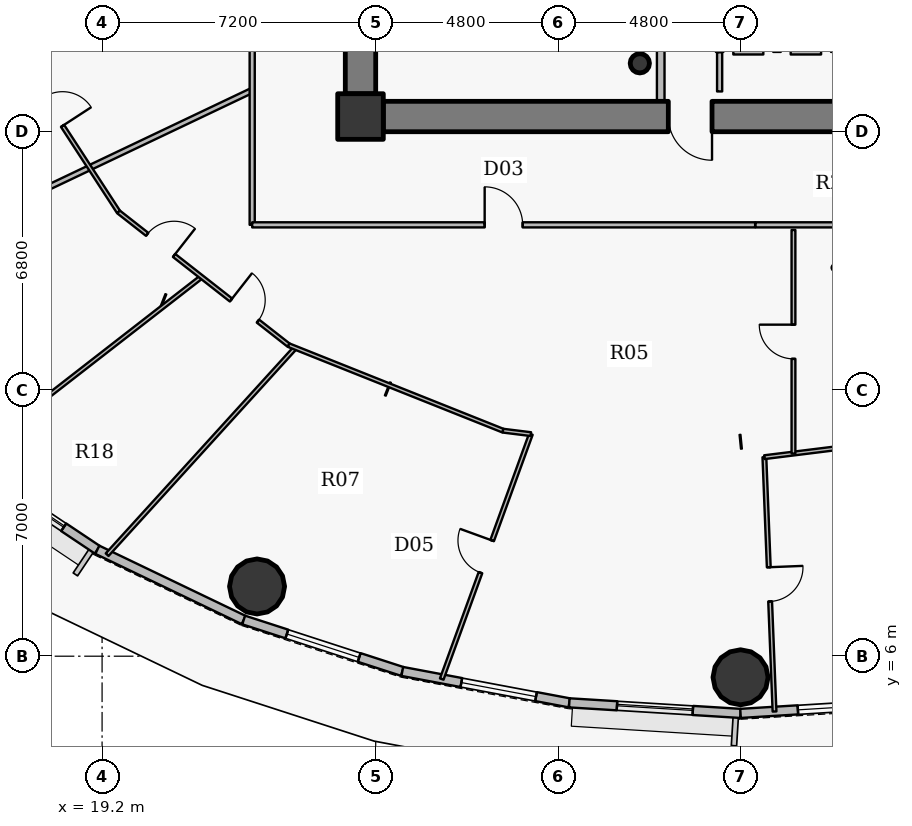
"""IFC4 building model, lengths in metres.
Left out: names, types, materials, properties, quantities, classifications, styles, units other than length and angle.
Written with IfcOpenShell. Run it as: python <this file> out.ifc"""

import sys

from ifc_helpers import new_model, si_unit, direction, frame, frame_2d, origin, origin_2d, place, context, subcontext, project, spatial, rectangle, hollow_circle, extrude, source, transform, mapped, element, fill, save


model = new_model("IFC4")
c1 = context("Model", 3, precision=1e-05, world=origin(), true_north=direction((0.0, 1.0)))
c2 = subcontext(c1, "Body", "Model", "MODEL_VIEW")
j1 = project(units=[si_unit("LENGTHUNIT", "METRE"), si_unit("PLANEANGLEUNIT", "RADIAN")], contexts=[c1])
p1 = place(None, origin())
s1 = spatial("IfcSite", under=j1, at=p1, CompositionType="ELEMENT")
p2 = place(p1, origin())
s2 = spatial("IfcBuilding", under=s1, at=p2, CompositionType="ELEMENT")
p3 = place(p2, frame((0.0, 0.0, 92.4)))
s3 = spatial("IfcBuildingStorey", under=s2, at=p3, CompositionType="ELEMENT", Elevation=92.4)
p4 = place(p3, frame((26.0, 20.2, 0.0), z_axis=(0.0, 0.0, 1.0), x_axis=(1.0, 0.0, 0.0)))
e1 = element("IfcColumn", 1, at=p4, inside=s3, PredefinedType="COLUMN", context=c2, shape_type="SweptSolid", body=[
    extrude(rectangle(XDim=1.2, YDim=1.2, at=origin_2d()), origin(), (0.0, 0.0, 1.0), 4.8),
])
p5 = place(p3, frame((33.35, 21.6, 0.0), z_axis=(0.0, 0.0, 1.0), x_axis=(1.0, 0.0, 0.0)))
e2 = element("IfcColumn", 2, at=p5, inside=s3, PredefinedType="COLUMN", context=c2, shape_type="SweptSolid", body=[
    extrude(hollow_circle(Radius=0.254, WallThickness=0.02, at=origin_2d()), origin(), (0.0, 0.0, 1.0), 4.8),
])
p6 = place(p3, frame((45.4, 20.2, 0.0), z_axis=(0.0, 0.0, 1.0), x_axis=(-1.0, 0.0, 0.0)))
e3 = element("IfcWall", 3, at=p6, inside=s3, PredefinedType="SHEAR", context=c2, shape_type="SweptSolid", body=[
    extrude(rectangle(XDim=18.8, YDim=0.8, at=frame_2d((9.4, 0.0))), origin(), (0.0, 0.0, 1.0), 4.0),
])
p7 = place(p6, frame((10.15, 0.0, 0.0)))
e4 = element("IfcOpeningElement", 4, at=p7, cuts=e3, PredefinedType="OPENING", context=c2, shape_type="SweptSolid", body=[
    extrude(rectangle(XDim=1.15, YDim=2.15, at=origin_2d()), frame((0.575, 0.41, 1.075), z_axis=(0.0, -1.0, 0.0), x_axis=(1.0, 0.0, 0.0)), (0.0, 0.0, 1.0), 0.82),
])
p8 = place(p3, frame((26.0, 20.8, 0.0), z_axis=(0.0, 0.0, 1.0), x_axis=(0.0, 1.0, 0.0)))
e5 = element("IfcWall", 5, at=p8, inside=s3, PredefinedType="SHEAR", context=c2, shape_type="SweptSolid", body=[
    extrude(rectangle(XDim=12.4, YDim=0.8, at=frame_2d((6.2, 0.0))), origin(), (0.0, 0.0, 1.0), 4.0),
])
p9 = place(p8, frame((5.79, 0.0, 0.0)))
e6 = element("IfcOpeningElement", 6, at=p9, cuts=e5, PredefinedType="OPENING", context=c2, shape_type="SweptSolid", body=[
    extrude(rectangle(XDim=0.82, YDim=2.1, at=origin_2d()), frame((0.41, 0.41, 1.05), z_axis=(0.0, -1.0, 0.0), x_axis=(1.0, 0.0, 0.0)), (0.0, 0.0, 1.0), 0.82),
])
for number, where, z_axis, x_axis in (
    (7, (23.278, 7.835, -0.3), (0.0, 0.0, 1.0), (1.0, 0.0, 0.0)),
    (8, (36.0, 5.445, -0.3), (0.0, 0.0, 1.0), (1.0, 0.0, 0.0)),
):
    element("IfcColumn", number, at=place(p3, frame(where, z_axis=z_axis, x_axis=x_axis)), inside=s3, PredefinedType="COLUMN", context=c2, shape_type="SweptSolid", body=[
        extrude(hollow_circle(Radius=0.725, WallThickness=0.042, at=origin_2d()), origin(), (0.0, 0.0, 1.0), 5.1),
    ])
p10 = place(p3, frame((19.075, 8.801, 0.0), z_axis=(0.0, 0.0, 1.0), x_axis=(-0.831221811447, 0.555940914284, 0.0)))
e9 = element("IfcWall", 9, at=p10, inside=s3, PredefinedType="SOLIDWALL", context=c2, shape_type="SweptSolid", body=[
    extrude(rectangle(XDim=4.13, YDim=0.24, at=frame_2d((2.065, 0.0))), origin(), (0.0, 0.0, 1.0), 4.55),
])
p11 = place(p10, frame((1.065, 0.0, 0.9)))
e10 = element("IfcOpeningElement", 10, at=p11, cuts=e9, PredefinedType="OPENING", context=c2, shape_type="SweptSolid", body=[
    extrude(rectangle(XDim=2.0, YDim=1.75, at=origin_2d()), frame((1.0, 0.13, 0.875), z_axis=(0.0, -1.0, 0.0), x_axis=(1.0, 0.0, 0.0)), (0.0, 0.0, 1.0), 0.26),
])
p12 = place(p3, frame((22.926, 6.953, 0.0), z_axis=(0.0, 0.0, 1.0), x_axis=(-0.901589935876, 0.432591709962, 0.0)))
e11 = element("IfcWall", 11, at=p12, inside=s3, PredefinedType="SOLIDWALL", context=c2, shape_type="SweptSolid", body=[
    extrude(rectangle(XDim=4.272, YDim=0.24, at=frame_2d((2.136, 0.0))), origin(), (0.0, 0.0, 1.0), 4.55),
])
p13 = place(p3, frame((27.1, 5.599, 0.0), z_axis=(0.0, 0.0, 1.0), x_axis=(-0.951211346073, 0.308540070495, 0.0)))
e12 = element("IfcWall", 12, at=p13, inside=s3, PredefinedType="SOLIDWALL", context=c2, shape_type="SweptSolid", body=[
    extrude(rectangle(XDim=4.388, YDim=0.24, at=frame_2d((2.194, 0.0))), origin(), (0.0, 0.0, 1.0), 4.55),
])
p14 = place(p13, frame((1.194, 0.0, 0.9)))
e13 = element("IfcOpeningElement", 13, at=p14, cuts=e12, PredefinedType="OPENING", context=c2, shape_type="SweptSolid", body=[
    extrude(rectangle(XDim=2.0, YDim=1.75, at=origin_2d()), frame((1.0, 0.13, 0.875), z_axis=(0.0, -1.0, 0.0), x_axis=(1.0, 0.0, 0.0)), (0.0, 0.0, 1.0), 0.26),
])
p15 = place(p3, frame((31.494, 4.773, 0.0), z_axis=(0.0, 0.0, 1.0), x_axis=(-0.982789252177, 0.184730305596, 0.0)))
e14 = element("IfcWall", 14, at=p15, inside=s3, PredefinedType="SOLIDWALL", context=c2, shape_type="SweptSolid", body=[
    extrude(rectangle(XDim=4.471, YDim=0.24, at=frame_2d((2.235, 0.0))), origin(), (0.0, 0.0, 1.0), 4.55),
])
p16 = place(p15, frame((0.89, 0.0, 0.9)))
e15 = element("IfcOpeningElement", 15, at=p16, cuts=e14, PredefinedType="OPENING", context=c2, shape_type="SweptSolid", body=[
    extrude(rectangle(XDim=2.0, YDim=1.75, at=origin_2d()), frame((1.0, 0.13, 0.875), z_axis=(0.0, -1.0, 0.0), x_axis=(1.0, 0.0, 0.0)), (0.0, 0.0, 1.0), 0.26),
])
p17 = place(p3, frame((36.0, 4.495, 0.0), z_axis=(0.0, 0.0, 1.0), x_axis=(-0.998107531589, 0.061492726276, 0.0)))
e16 = element("IfcWall", 16, at=p17, inside=s3, PredefinedType="SOLIDWALL", context=c2, shape_type="SweptSolid", body=[
    extrude(rectangle(XDim=4.514, YDim=0.24, at=frame_2d((2.257, 0.0))), origin(), (0.0, 0.0, 1.0), 4.55),
])
p18 = place(p17, frame((1.257, 0.0, 0.9)))
e17 = element("IfcOpeningElement", 17, at=p18, cuts=e16, PredefinedType="OPENING", context=c2, shape_type="SweptSolid", body=[
    extrude(rectangle(XDim=2.0, YDim=1.75, at=origin_2d()), frame((1.0, 0.13, 0.875), z_axis=(0.0, -1.0, 0.0), x_axis=(1.0, 0.0, 0.0)), (0.0, 0.0, 1.0), 0.26),
])
p19 = place(p3, frame((40.506, 4.773, 0.0), z_axis=(0.0, 0.0, 1.0), x_axis=(-0.998107531589, -0.061492726276, 0.0)))
e18 = element("IfcWall", 18, at=p19, inside=s3, PredefinedType="SOLIDWALL", context=c2, shape_type="SweptSolid", body=[
    extrude(rectangle(XDim=4.514, YDim=0.24, at=frame_2d((2.257, 0.0))), origin(), (0.0, 0.0, 1.0), 4.55),
])
p20 = place(p19, frame((1.001, 0.0, 0.9)))
e19 = element("IfcOpeningElement", 19, at=p20, cuts=e18, PredefinedType="OPENING", context=c2, shape_type="SweptSolid", body=[
    extrude(rectangle(XDim=2.0, YDim=1.75, at=origin_2d()), frame((1.0, 0.13, 0.875), z_axis=(0.0, -1.0, 0.0), x_axis=(1.0, 0.0, 0.0)), (0.0, 0.0, 1.0), 0.26),
])
p21 = place(p3, frame((11.486, 15.34, 0.0), z_axis=(0.0, 0.0, 1.0), x_axis=(0.903055043221, 0.429524840857, 0.0)))
e20 = element("IfcWall", 20, at=p21, inside=s3, PredefinedType="PARTITIONING", context=c2, shape_type="SweptSolid", body=[
    extrude(rectangle(XDim=12.916, YDim=0.135, at=frame_2d((6.458, 0.0))), origin(), (0.0, 0.0, 1.0), 3.985),
])
p22 = place(p3, frame((15.586, 11.141, 0.0), z_axis=(0.0, 0.0, 1.0), x_axis=(0.789708718244, 0.613481980445, 0.0)))
e21 = element("IfcWall", 21, at=p22, inside=s3, PredefinedType="PARTITIONING", context=c2, shape_type="SweptSolid", body=[
    extrude(rectangle(XDim=7.888, YDim=0.1, at=frame_2d((3.944, 0.0))), origin(), (0.0, 0.0, 1.0), 3.985),
])
p23 = place(p3, frame((16.76, 22.105, 0.0), z_axis=(0.0, 0.0, 1.0), x_axis=(0.545405249109, -0.838172484781, 0.0)))
e22 = element("IfcWall", 22, at=p23, inside=s3, PredefinedType="PARTITIONING", context=c2, shape_type="SweptSolid", body=[
    extrude(rectangle(XDim=5.269, YDim=0.1, at=frame_2d((2.634, 0.0))), origin(), (0.0, 0.0, 1.0), 3.985),
])
p24 = place(p23, frame((1.666, 0.0, 0.0)))
e23 = element("IfcOpeningElement", 23, at=p24, cuts=e22, PredefinedType="OPENING", context=c2, shape_type="SweptSolid", body=[
    extrude(rectangle(XDim=0.9, YDim=2.1, at=origin_2d()), frame((0.45, 0.06, 1.05), z_axis=(0.0, -1.0, 0.0), x_axis=(1.0, 0.0, 0.0)), (0.0, 0.0, 1.0), 0.12),
])
p25 = place(p3, frame((19.333, 8.671, 0.0), z_axis=(0.0, 0.0, 1.0), x_axis=(0.672765273406, 0.739855990649, 0.0)))
e24 = element("IfcWall", 24, at=p25, inside=s3, PredefinedType="PARTITIONING", context=c2, shape_type="SweptSolid", body=[
    extrude(rectangle(XDim=7.358, YDim=0.1, at=frame_2d((3.679, 0.0))), origin(), (0.0, 0.0, 1.0), 3.985),
])
p26 = place(p3, frame((19.634, 17.689, 0.0), z_axis=(0.0, 0.0, 1.0), x_axis=(0.787333679705, -0.616527109544, 0.0)))
e25 = element("IfcWall", 25, at=p26, inside=s3, PredefinedType="PARTITIONING", context=c2, shape_type="SweptSolid", body=[
    extrude(rectangle(XDim=5.685, YDim=0.1, at=frame_2d((2.842, 0.0))), origin(), (0.0, 0.0, 1.0), 3.985),
])
p27 = place(p26, frame((0.956, 0.0, 0.0)))
e26 = element("IfcOpeningElement", 26, at=p27, cuts=e25, PredefinedType="OPENING", context=c2, shape_type="SweptSolid", body=[
    extrude(rectangle(XDim=0.9, YDim=2.1, at=origin_2d()), frame((0.45, 0.06, 1.05), z_axis=(0.0, -1.0, 0.0), x_axis=(1.0, 0.0, 0.0)), (0.0, 0.0, 1.0), 0.12),
])
p28 = place(p26, frame((3.758, 0.0, 0.0)))
e27 = element("IfcOpeningElement", 27, at=p28, cuts=e25, PredefinedType="OPENING", context=c2, shape_type="SweptSolid", body=[
    extrude(rectangle(XDim=0.9, YDim=2.1, at=origin_2d()), frame((0.45, 0.06, 1.05), z_axis=(0.0, -1.0, 0.0), x_axis=(1.0, 0.0, 0.0)), (0.0, 0.0, 1.0), 0.12),
])
p29 = place(p3, frame((23.15, 17.35, 0.0), z_axis=(0.0, 0.0, 1.0), x_axis=(0.0, 1.0, 0.0)))
e28 = element("IfcWall", 28, at=p29, inside=s3, PredefinedType="PARTITIONING", context=c2, shape_type="SweptSolid", body=[
    extrude(rectangle(XDim=19.3, YDim=0.135, at=frame_2d((9.65, 0.0))), origin(), (0.0, 0.0, 1.0), 3.985),
])
p30 = place(p29, frame((10.899, 0.0, 0.0)))
e29 = element("IfcOpeningElement", 29, at=p30, cuts=e28, PredefinedType="OPENING", context=c2, shape_type="SweptSolid", body=[
    extrude(rectangle(XDim=1.0, YDim=2.15, at=origin_2d()), frame((0.5, 0.078, 1.075), z_axis=(0.0, -1.0, 0.0), x_axis=(1.0, 0.0, 0.0)), (0.0, 0.0, 1.0), 0.155),
])
p31 = place(p3, frame((23.15, 17.35, 0.0), z_axis=(0.0, 0.0, 1.0), x_axis=(1.0, 0.0, 0.0)))
e30 = element("IfcWall", 30, at=p31, inside=s3, PredefinedType="PARTITIONING", context=c2, shape_type="SweptSolid", body=[
    extrude(rectangle(XDim=13.235, YDim=0.135, at=frame_2d((6.617, 0.0))), origin(), (0.0, 0.0, 1.0), 3.985),
])
p32 = place(p31, frame((6.117, 0.0, 0.0)))
e31 = element("IfcOpeningElement", 31, at=p32, cuts=e30, PredefinedType="OPENING", context=c2, shape_type="SweptSolid", body=[
    extrude(rectangle(XDim=1.0, YDim=2.15, at=origin_2d()), frame((0.5, 0.078, 1.075), z_axis=(0.0, -1.0, 0.0), x_axis=(1.0, 0.0, 0.0)), (0.0, 0.0, 1.0), 0.155),
])
p33 = place(p3, frame((24.109, 14.184, 0.0), z_axis=(0.0, 0.0, 1.0), x_axis=(0.928803554156, -0.370572473055, 0.0)))
e32 = element("IfcWall", 32, at=p33, inside=s3, PredefinedType="PARTITIONING", context=c2, shape_type="SweptSolid", body=[
    extrude(rectangle(XDim=6.072, YDim=0.1, at=frame_2d((3.036, 0.0))), origin(), (0.0, 0.0, 1.0), 3.985),
])
p34 = place(p3, frame((28.138, 5.399, 0.0), z_axis=(0.0, 0.0, 1.0), x_axis=(0.342028873388, 0.939689443257, 0.0)))
e33 = element("IfcWall", 33, at=p34, inside=s3, PredefinedType="PARTITIONING", context=c2, shape_type="SweptSolid", body=[
    extrude(rectangle(XDim=6.858, YDim=0.1, at=frame_2d((3.429, 0.0))), origin(), (0.0, 0.0, 1.0), 3.985),
])
p35 = place(p34, frame((2.979, 0.0, 0.0)))
e34 = element("IfcOpeningElement", 34, at=p35, cuts=e33, PredefinedType="OPENING", context=c2, shape_type="SweptSolid", body=[
    extrude(rectangle(XDim=0.9, YDim=2.1, at=origin_2d()), frame((0.45, 0.06, 1.05), z_axis=(0.0, -1.0, 0.0), x_axis=(1.0, 0.0, 0.0)), (0.0, 0.0, 1.0), 0.12),
])
p36 = place(p3, frame((29.749, 11.934, 0.0), z_axis=(0.0, 0.0, 1.0), x_axis=(0.992409197435, -0.122979611509, 0.0)))
e35 = element("IfcWall", 35, at=p36, inside=s3, PredefinedType="PARTITIONING", context=c2, shape_type="SweptSolid", body=[
    extrude(rectangle(XDim=0.74, YDim=0.1, at=frame_2d((0.37, 0.0))), origin(), (0.0, 0.0, 1.0), 4.55),
])
p37 = place(p3, frame((33.9, 20.6, 0.0), z_axis=(0.0, 0.0, 1.0), x_axis=(0.0, 1.0, 0.0)))
e36 = element("IfcWall", 36, at=p37, inside=s3, PredefinedType="PARTITIONING", context=c2, shape_type="SweptSolid", body=[
    extrude(rectangle(XDim=11.5, YDim=0.2, at=frame_2d((5.75, 0.0))), origin(), (0.0, 0.0, 1.0), 4.135),
])
p38 = place(p3, frame((36.628, 11.237, 0.0), z_axis=(0.0, 0.0, 1.0), x_axis=(0.039809346011, -0.999207293794, 0.0)))
e37 = element("IfcWall", 37, at=p38, inside=s3, PredefinedType="PARTITIONING", context=c2, shape_type="SweptSolid", body=[
    extrude(rectangle(XDim=6.697, YDim=0.1, at=frame_2d((3.349, 0.0))), origin(), (0.0, 0.0, 1.0), 3.985),
])
p39 = place(p38, frame((2.898, 0.0, 0.0)))
e38 = element("IfcOpeningElement", 38, at=p39, cuts=e37, PredefinedType="OPENING", context=c2, shape_type="SweptSolid", body=[
    extrude(rectangle(XDim=0.9, YDim=2.1, at=origin_2d()), frame((0.45, 0.06, 1.05), z_axis=(0.0, -1.0, 0.0), x_axis=(1.0, 0.0, 0.0)), (0.0, 0.0, 1.0), 0.12),
])
p40 = place(p3, frame((36.628, 11.237, 0.0), z_axis=(0.0, 0.0, 1.0), x_axis=(0.992395411507, 0.123090808834, 0.0)))
e39 = element("IfcWall", 39, at=p40, inside=s3, PredefinedType="PARTITIONING", context=c2, shape_type="SweptSolid", body=[
    extrude(rectangle(XDim=5.667, YDim=0.1, at=frame_2d((2.833, 0.0))), origin(), (0.0, 0.0, 1.0), 3.985),
])
p41 = place(p3, frame((37.393, 11.332, 0.0), z_axis=(0.0, 0.0, 1.0), x_axis=(0.0, 1.0, 0.0)))
e40 = element("IfcWall", 40, at=p41, inside=s3, PredefinedType="PARTITIONING", context=c2, shape_type="SweptSolid", body=[
    extrude(rectangle(XDim=5.884, YDim=0.1, at=frame_2d((2.942, 0.0))), origin(), (0.0, 0.0, 1.0), 4.035),
])
p42 = place(p41, frame((2.492, 0.0, 0.0)))
e41 = element("IfcOpeningElement", 41, at=p42, cuts=e40, PredefinedType="OPENING", context=c2, shape_type="SweptSolid", body=[
    extrude(rectangle(XDim=0.9, YDim=2.1, at=origin_2d()), frame((0.45, 0.06, 1.05), z_axis=(0.0, -1.0, 0.0), x_axis=(1.0, 0.0, 0.0)), (0.0, 0.0, 1.0), 0.12),
])
p43 = place(p3, frame((36.6, 21.9, 0.0), z_axis=(0.0, 0.0, 1.0), x_axis=(-1.0, 0.0, 0.0)))
e42 = element("IfcWall", 42, at=p43, inside=s3, PredefinedType="PARTITIONING", context=c2, shape_type="SweptSolid", body=[
    extrude(rectangle(XDim=0.79, YDim=0.135, at=frame_2d((0.395, 0.0))), origin(), (0.0, 0.0, 1.0), 4.55),
])
p44 = place(p3, frame((38.12, 21.9, 0.0), z_axis=(0.0, 0.0, 1.0), x_axis=(-1.0, 0.0, 0.0)))
e43 = element("IfcWall", 43, at=p44, inside=s3, PredefinedType="PARTITIONING", context=c2, shape_type="SweptSolid", body=[
    extrude(rectangle(XDim=0.8, YDim=0.135, at=frame_2d((0.4, 0.0))), origin(), (0.0, 0.0, 1.0), 4.55),
])
p45 = place(p3, frame((35.45, 21.89, 0.0), z_axis=(0.0, 0.0, 1.0), x_axis=(0.0, -1.0, 0.0)))
e44 = element("IfcWall", 44, at=p45, inside=s3, PredefinedType="PARTITIONING", context=c2, shape_type="SweptSolid", body=[
    extrude(rectangle(XDim=1.03, YDim=0.135, at=frame_2d((0.515, 0.0))), origin(), (0.0, 0.0, 1.0), 4.135),
])
p46 = place(p3, frame((38.467, 17.35, 0.0), z_axis=(0.0, 0.0, 1.0), x_axis=(-1.0, 0.0, 0.0)))
e45 = element("IfcWall", 45, at=p46, inside=s3, PredefinedType="PARTITIONING", context=c2, shape_type="SweptSolid", body=[
    extrude(rectangle(XDim=2.073, YDim=0.135, at=frame_2d((1.036, 0.0))), origin(), (0.0, 0.0, 1.0), 4.55),
])
p47 = place(p3, frame((25.6, 20.79, 0.0), z_axis=(0.0, 0.0, 1.0), x_axis=(0.0, -1.0, 0.0)))
e46 = element("IfcWall", 46, at=p47, inside=s3, PredefinedType="PARTITIONING", context=c2, shape_type="SweptSolid", body=[
    extrude(rectangle(XDim=0.99, YDim=0.135, at=frame_2d((0.495, 0.0))), origin(), (0.0, 0.0, 1.0), 4.55),
])
p48 = place(p3, frame((25.907, 19.8, 0.0), z_axis=(0.0, 0.0, 1.0), x_axis=(1.0, 0.0, 0.0)))
e47 = element("IfcWall", 47, at=p48, inside=s3, PredefinedType="PARTITIONING", context=c2, shape_type="SweptSolid", body=[
    extrude(rectangle(XDim=0.683, YDim=0.135, at=frame_2d((0.341, 0.0))), origin(), (0.0, 0.0, 1.0), 3.985),
])
m1 = source(origin(), c2, "Body", "SweptSolid", [
    extrude(rectangle(XDim=2.0, YDim=1.75, at=origin_2d()), frame((1.0, 0.03, 0.875), z_axis=(0.0, -1.0, 0.0), x_axis=(1.0, 0.0, 0.0)), (0.0, 0.0, 1.0), 0.06),
])
p49 = place(p11, origin())
e48 = element("IfcWindow", 48, at=p49, inside=s3, PartitioningType="DOUBLE_PANEL_VERTICAL", PredefinedType="WINDOW", context=c2, shape_type="MappedRepresentation", body=[
    mapped(m1, transform((0.0, 0.0, 0.0), x_axis=(1.0, 0.0, 0.0), y_axis=(0.0, 1.0, 0.0), z_axis=(0.0, 0.0, 1.0), scale=1.0)),
])
fill(e10, e48)
p50 = place(p14, origin())
e49 = element("IfcWindow", 49, at=p50, inside=s3, PartitioningType="DOUBLE_PANEL_VERTICAL", PredefinedType="WINDOW", context=c2, shape_type="MappedRepresentation", body=[
    mapped(m1, transform((0.0, 0.0, 0.0), x_axis=(1.0, 0.0, 0.0), y_axis=(0.0, 1.0, 0.0), z_axis=(0.0, 0.0, 1.0), scale=1.0)),
])
fill(e13, e49)
p51 = place(p16, origin())
e50 = element("IfcWindow", 50, at=p51, inside=s3, PartitioningType="DOUBLE_PANEL_VERTICAL", PredefinedType="WINDOW", context=c2, shape_type="MappedRepresentation", body=[
    mapped(m1, transform((0.0, 0.0, 0.0), x_axis=(1.0, 0.0, 0.0), y_axis=(0.0, 1.0, 0.0), z_axis=(0.0, 0.0, 1.0), scale=1.0)),
])
fill(e15, e50)
p52 = place(p18, origin())
e51 = element("IfcWindow", 51, at=p52, inside=s3, PartitioningType="DOUBLE_PANEL_VERTICAL", PredefinedType="WINDOW", context=c2, shape_type="MappedRepresentation", body=[
    mapped(m1, transform((0.0, 0.0, 0.0), x_axis=(1.0, 0.0, 0.0), y_axis=(0.0, 1.0, 0.0), z_axis=(0.0, 0.0, 1.0), scale=1.0)),
])
fill(e17, e51)
p53 = place(p20, origin())
e52 = element("IfcWindow", 52, at=p53, inside=s3, PartitioningType="DOUBLE_PANEL_VERTICAL", PredefinedType="WINDOW", context=c2, shape_type="MappedRepresentation", body=[
    mapped(m1, transform((0.0, 0.0, 0.0), x_axis=(1.0, 0.0, 0.0), y_axis=(0.0, 1.0, 0.0), z_axis=(0.0, 0.0, 1.0), scale=1.0)),
])
fill(e19, e52)
m2 = source(origin(), c2, "Body", "SweptSolid", [
    extrude(rectangle(XDim=1.15, YDim=2.15, at=origin_2d()), frame((0.575, 0.025, 1.075), z_axis=(0.0, -1.0, 0.0), x_axis=(1.0, 0.0, 0.0)), (0.0, 0.0, 1.0), 0.05),
])
p54 = place(p7, origin())
e53 = element("IfcDoor", 53, at=p54, inside=s3, OperationType="SINGLE_SWING_LEFT", PredefinedType="DOOR", context=c2, shape_type="MappedRepresentation", body=[
    mapped(m2, transform((0.0, 0.0, 0.0), x_axis=(1.0, 0.0, 0.0), y_axis=(0.0, 1.0, 0.0), z_axis=(0.0, 0.0, 1.0), scale=1.0)),
])
fill(e4, e53)
m3 = source(origin(), c2, "Body", "SweptSolid", [
    extrude(rectangle(XDim=0.9, YDim=2.1, at=origin_2d()), frame((0.45, 0.025, 1.05), z_axis=(0.0, -1.0, 0.0), x_axis=(1.0, 0.0, 0.0)), (0.0, 0.0, 1.0), 0.05),
])
p55 = place(p24, origin())
e54 = element("IfcDoor", 54, at=p55, inside=s3, OperationType="SINGLE_SWING_RIGHT", PredefinedType="DOOR", context=c2, shape_type="MappedRepresentation", body=[
    mapped(m3, transform((0.0, 0.0, 0.0), x_axis=(1.0, 0.0, 0.0), y_axis=(0.0, 1.0, 0.0), z_axis=(0.0, 0.0, 1.0), scale=1.0)),
])
fill(e23, e54)
m4 = source(origin(), c2, "Body", "SweptSolid", [
    extrude(rectangle(XDim=1.0, YDim=2.15, at=origin_2d()), frame((0.5, 0.025, 1.075), z_axis=(0.0, -1.0, 0.0), x_axis=(1.0, 0.0, 0.0)), (0.0, 0.0, 1.0), 0.05),
])
p56 = place(p32, origin())
e55 = element("IfcDoor", 55, at=p56, inside=s3, OperationType="SINGLE_SWING_LEFT", PredefinedType="DOOR", context=c2, shape_type="MappedRepresentation", body=[
    mapped(m4, transform((0.0, 0.0, 0.0), x_axis=(1.0, 0.0, 0.0), y_axis=(0.0, 1.0, 0.0), z_axis=(0.0, 0.0, 1.0), scale=1.0)),
])
fill(e31, e55)
p57 = place(p27, origin())
e56 = element("IfcDoor", 56, at=p57, inside=s3, OperationType="SINGLE_SWING_RIGHT", PredefinedType="DOOR", context=c2, shape_type="MappedRepresentation", body=[
    mapped(m3, transform((0.0, 0.0, 0.0), x_axis=(1.0, 0.0, 0.0), y_axis=(0.0, 1.0, 0.0), z_axis=(0.0, 0.0, 1.0), scale=1.0)),
])
fill(e26, e56)
p58 = place(p28, origin())
e57 = element("IfcDoor", 57, at=p58, inside=s3, OperationType="SINGLE_SWING_LEFT", PredefinedType="DOOR", context=c2, shape_type="MappedRepresentation", body=[
    mapped(m3, transform((0.0, 0.0, 0.0), x_axis=(1.0, 0.0, 0.0), y_axis=(0.0, 1.0, 0.0), z_axis=(0.0, 0.0, 1.0), scale=1.0)),
])
fill(e27, e57)
p59 = place(p35, origin())
e58 = element("IfcDoor", 58, at=p59, inside=s3, OperationType="SINGLE_SWING_RIGHT", PredefinedType="DOOR", context=c2, shape_type="MappedRepresentation", body=[
    mapped(m3, transform((0.0, 0.0, 0.0), x_axis=(1.0, 0.0, 0.0), y_axis=(0.0, 1.0, 0.0), z_axis=(0.0, 0.0, 1.0), scale=1.0)),
])
fill(e34, e58)
p60 = place(p39, origin())
e59 = element("IfcDoor", 59, at=p60, inside=s3, OperationType="SINGLE_SWING_LEFT", PredefinedType="DOOR", context=c2, shape_type="MappedRepresentation", body=[
    mapped(m3, transform((0.0, 0.0, 0.0), x_axis=(1.0, 0.0, 0.0), y_axis=(0.0, 1.0, 0.0), z_axis=(0.0, 0.0, 1.0), scale=1.0)),
])
fill(e38, e59)
p61 = place(p42, origin())
e60 = element("IfcDoor", 60, at=p61, inside=s3, OperationType="SINGLE_SWING_RIGHT", PredefinedType="DOOR", context=c2, shape_type="MappedRepresentation", body=[
    mapped(m3, transform((0.0, 0.0, 0.0), x_axis=(1.0, 0.0, 0.0), y_axis=(0.0, 1.0, 0.0), z_axis=(0.0, 0.0, 1.0), scale=1.0)),
])
fill(e41, e60)
save(model, sys.argv[1])
